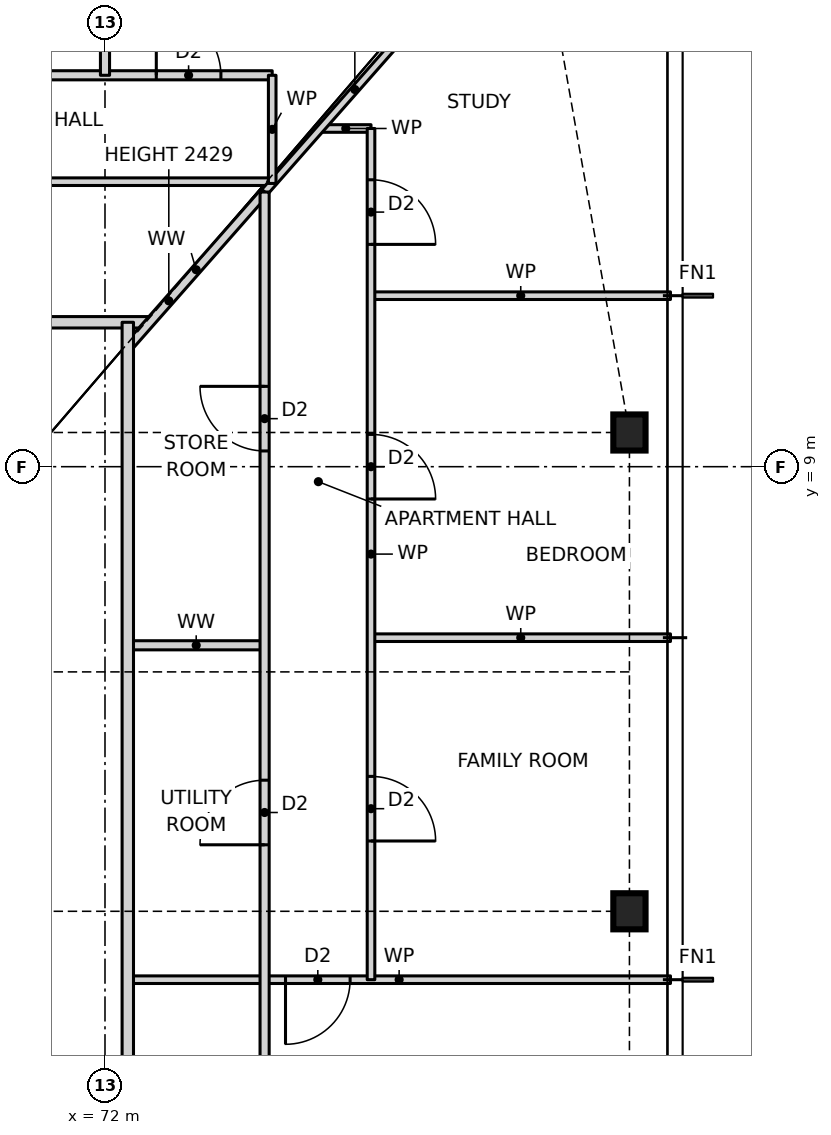
"""IFC4 building model, lengths in metres.
Left out: names, types, materials, properties, quantities, classifications, styles, units other than length and angle.
Written with IfcOpenShell. Run it as: python <this file> out.ifc"""

import sys

from ifc_helpers import new_model, si_unit, direction, frame, frame_2d, origin, origin_2d, place, context, subcontext, project, spatial, rectangle, i_section, extrude, element, fill, save


model = new_model("IFC4")
c1 = context("Model", 3, precision=1e-05, world=origin(), true_north=direction((0.0, 1.0)))
c2 = subcontext(c1, "Body", "Model", "MODEL_VIEW")
j1 = project(units=[si_unit("LENGTHUNIT", "METRE"), si_unit("PLANEANGLEUNIT", "RADIAN")], contexts=[c1])
p1 = place(None, origin())
s1 = spatial("IfcSite", under=j1, at=p1, CompositionType="ELEMENT")
p2 = place(p1, origin())
s2 = spatial("IfcBuilding", under=s1, at=p2, CompositionType="ELEMENT")
p3 = place(p2, frame((0.0, 0.0, 36.0)))
s3 = spatial("IfcBuildingStorey", under=s2, at=p3, CompositionType="ELEMENT", Elevation=36.0)
for number, where, z_axis, x_axis in (
    (1, (78.9, 3.15, 0.0), (0.0, 0.0, 1.0), (1.0, 0.0, 0.0)),
    (2, (78.9, 9.45, 0.0), (0.0, 0.0, 1.0), (1.0, 0.0, 0.0)),
):
    element("IfcColumn", number, at=place(p3, frame(where, z_axis=z_axis, x_axis=x_axis)), inside=s3, PredefinedType="COLUMN", context=c2, shape_type="SweptSolid", body=[
        extrude(i_section(OverallWidth=0.424, OverallDepth=0.475, WebThickness=0.048, FlangeThickness=0.077, at=origin_2d()), origin(), (0.0, 0.0, 1.0), 3.5),
    ])
p4 = place(p3, frame((72.3, 2.25, 0.0), z_axis=(0.0, 0.0, 1.0), x_axis=(1.0, 0.0, 0.0)))
e3 = element("IfcWall", 3, at=p4, inside=s3, PredefinedType="PARTITIONING", context=c2, shape_type="SweptSolid", body=[
    extrude(rectangle(XDim=7.14, YDim=0.1, at=frame_2d((3.57, 0.0))), origin(), (0.0, 0.0, 1.0), 3.27),
])
p5 = place(p4, frame((2.075, 0.0, 0.0)))
e4 = element("IfcOpeningElement", 4, at=p5, cuts=e3, PredefinedType="OPENING", context=c2, shape_type="SweptSolid", body=[
    extrude(rectangle(XDim=0.85, YDim=2.1, at=frame_2d((0.425, 1.05))), frame((0.0, 0.06, 0.0), z_axis=(0.0, -1.0, 0.0), x_axis=(1.0, 0.0, 0.0)), (0.0, 0.0, 1.0), 0.12),
])
p6 = place(p3, frame((72.3, 6.65, 0.0), z_axis=(0.0, 0.0, 1.0), x_axis=(1.0, 0.0, 0.0)))
e5 = element("IfcWall", 5, at=p6, inside=s3, PredefinedType="PARTITIONING", context=c2, shape_type="SweptSolid", body=[
    extrude(rectangle(XDim=1.8, YDim=0.12, at=frame_2d((0.9, 0.0))), origin(), (0.0, 0.0, 1.0), 3.27),
])
p7 = place(p3, frame((75.5, 6.75, 0.0), z_axis=(0.0, 0.0, 1.0), x_axis=(1.0, 0.0, 0.0)))
e6 = element("IfcWall", 6, at=p7, inside=s3, PredefinedType="PARTITIONING", context=c2, shape_type="SweptSolid", body=[
    extrude(rectangle(XDim=3.94, YDim=0.1, at=frame_2d((1.97, 0.0))), origin(), (0.0, 0.0, 1.0), 3.27),
])
p8 = place(p3, frame((53.408, 10.9, 0.0), z_axis=(0.0, 0.0, 1.0), x_axis=(1.0, 0.0, 0.0)))
e7 = element("IfcWall", 7, at=p8, inside=s3, PredefinedType="PARTITIONING", context=c2, shape_type="SweptSolid", body=[
    extrude(rectangle(XDim=19.184, YDim=0.15, at=frame_2d((9.592, 0.0))), origin(), (0.0, 0.0, 1.0), 3.27),
])
p9 = place(p8, frame((8.592, 0.0, 0.0)))
e8 = element("IfcOpeningElement", 8, at=p9, cuts=e7, PredefinedType="OPENING", context=c2, shape_type="SweptSolid", body=[
    extrude(rectangle(XDim=1.0, YDim=2.1, at=frame_2d((0.5, 1.05))), frame((0.0, 0.085, 0.0), z_axis=(0.0, -1.0, 0.0), x_axis=(1.0, 0.0, 0.0)), (0.0, 0.0, 1.0), 0.17),
])
p10 = place(p3, frame((75.5, 11.25, 0.0), z_axis=(0.0, 0.0, 1.0), x_axis=(1.0, 0.0, 0.0)))
e9 = element("IfcWall", 9, at=p10, inside=s3, PredefinedType="PARTITIONING", context=c2, shape_type="SweptSolid", body=[
    extrude(rectangle(XDim=3.94, YDim=0.1, at=frame_2d((1.97, 0.0))), origin(), (0.0, 0.0, 1.0), 3.27),
])
p11 = place(p3, frame((51.8, 12.75, 0.0), z_axis=(0.0, 0.0, 1.0), x_axis=(1.0, 0.0, 0.0)))
e10 = element("IfcWall", 10, at=p11, inside=s3, PredefinedType="PARTITIONING", context=c2, shape_type="SweptSolid", body=[
    extrude(rectangle(XDim=22.4, YDim=0.1, at=frame_2d((11.2, 0.0))), origin(), (0.0, 0.0, 1.0), 3.27),
])
p12 = place(p11, frame((13.475, 0.0, 0.0)))
e11 = element("IfcOpeningElement", 11, at=p12, cuts=e10, PredefinedType="OPENING", context=c2, shape_type="SweptSolid", body=[
    extrude(rectangle(XDim=0.85, YDim=2.1, at=frame_2d((0.425, 1.05))), frame((0.0, 0.06, 0.0), z_axis=(0.0, -1.0, 0.0), x_axis=(1.0, 0.0, 0.0)), (0.0, 0.0, 1.0), 0.12),
])
p13 = place(p11, frame((10.275, 0.0, 0.0)))
e12 = element("IfcOpeningElement", 12, at=p13, cuts=e10, PredefinedType="OPENING", context=c2, shape_type="SweptSolid", body=[
    extrude(rectangle(XDim=0.85, YDim=2.1, at=frame_2d((0.425, 1.05))), frame((0.0, 0.06, 0.0), z_axis=(0.0, -1.0, 0.0), x_axis=(1.0, 0.0, 0.0)), (0.0, 0.0, 1.0), 0.12),
])
p14 = place(p11, frame((18.625, 0.0, 0.0)))
e13 = element("IfcOpeningElement", 13, at=p14, cuts=e10, PredefinedType="OPENING", context=c2, shape_type="SweptSolid", body=[
    extrude(rectangle(XDim=0.85, YDim=2.1, at=frame_2d((0.425, 1.05))), frame((0.0, 0.06, 0.0), z_axis=(0.0, -1.0, 0.0), x_axis=(1.0, 0.0, 0.0)), (0.0, 0.0, 1.0), 0.12),
])
p15 = place(p11, frame((2.925, 0.0, 0.0)))
e14 = element("IfcOpeningElement", 14, at=p15, cuts=e10, PredefinedType="OPENING", context=c2, shape_type="SweptSolid", body=[
    extrude(rectangle(XDim=0.85, YDim=2.1, at=frame_2d((0.425, 1.05))), frame((0.0, 0.06, 0.0), z_axis=(0.0, -1.0, 0.0), x_axis=(1.0, 0.0, 0.0)), (0.0, 0.0, 1.0), 0.12),
])
p16 = place(p3, frame((74.836, 13.45, 0.0), z_axis=(0.0, 0.0, 1.0), x_axis=(1.0, 0.0, 0.0)))
e15 = element("IfcWall", 15, at=p16, inside=s3, PredefinedType="PARTITIONING", context=c2, shape_type="SweptSolid", body=[
    extrude(rectangle(XDim=0.664, YDim=0.1, at=frame_2d((0.332, 0.0))), origin(), (0.0, 0.0, 1.0), 3.27),
])
p17 = place(p3, frame((67.5, 14.15, 0.0), z_axis=(0.0, 0.0, 1.0), x_axis=(1.0, 0.0, 0.0)))
e16 = element("IfcWall", 16, at=p17, inside=s3, PredefinedType="PARTITIONING", context=c2, shape_type="SweptSolid", body=[
    extrude(rectangle(XDim=6.7, YDim=0.12, at=frame_2d((3.35, 0.0))), origin(), (0.0, 0.0, 1.0), 3.27),
])
p18 = place(p17, frame((0.625, 0.0, 0.0)))
e17 = element("IfcOpeningElement", 17, at=p18, cuts=e16, PredefinedType="OPENING", context=c2, shape_type="SweptSolid", body=[
    extrude(rectangle(XDim=0.85, YDim=2.1, at=frame_2d((0.425, 1.05))), frame((0.0, 0.07, 0.0), z_axis=(0.0, -1.0, 0.0), x_axis=(1.0, 0.0, 0.0)), (0.0, 0.0, 1.0), 0.14),
])
p19 = place(p17, frame((5.175, 0.0, 0.0)))
e18 = element("IfcOpeningElement", 18, at=p19, cuts=e16, PredefinedType="OPENING", context=c2, shape_type="SweptSolid", body=[
    extrude(rectangle(XDim=0.85, YDim=2.1, at=frame_2d((0.425, 1.05))), frame((0.0, 0.07, 0.0), z_axis=(0.0, -1.0, 0.0), x_axis=(1.0, 0.0, 0.0)), (0.0, 0.0, 1.0), 0.14),
])
p20 = place(p3, frame((74.1, 12.614, 0.0), z_axis=(0.0, 0.0, 1.0), x_axis=(0.660755619739, 0.750601099775, 0.0)))
e19 = element("IfcWall", 19, at=p20, inside=s3, PredefinedType="PARTITIONING", context=c2, shape_type="SweptSolid", body=[
    extrude(rectangle(XDim=5.989, YDim=0.1, at=frame_2d((2.995, 0.0))), origin(), (0.0, 0.0, 1.0), 2.429),
])
p21 = place(p3, frame((72.299, 10.569, 0.0), z_axis=(0.0, 0.0, 1.0), x_axis=(0.660797520752, 0.750564212155, 0.0)))
e20 = element("IfcWall", 20, at=p21, inside=s3, PredefinedType="PARTITIONING", context=c2, shape_type="SweptSolid", body=[
    extrude(rectangle(XDim=2.725, YDim=0.12, at=frame_2d((1.363, 0.0))), origin(), (0.0, 0.0, 1.0), 2.429),
])
p22 = place(p3, frame((75.5, 2.25, 0.0), z_axis=(0.0, 0.0, 1.0), x_axis=(0.0, 1.0, 0.0)))
e21 = element("IfcWall", 21, at=p22, inside=s3, PredefinedType="PARTITIONING", context=c2, shape_type="SweptSolid", body=[
    extrude(rectangle(XDim=11.2, YDim=0.1, at=frame_2d((5.6, 0.0))), origin(), (0.0, 0.0, 1.0), 3.27),
])
p23 = place(p22, frame((1.825, 0.0, 0.0)))
e22 = element("IfcOpeningElement", 22, at=p23, cuts=e21, PredefinedType="OPENING", context=c2, shape_type="SweptSolid", body=[
    extrude(rectangle(XDim=0.85, YDim=2.1, at=frame_2d((0.425, 1.05))), frame((0.0, 0.06, 0.0), z_axis=(0.0, -1.0, 0.0), x_axis=(1.0, 0.0, 0.0)), (0.0, 0.0, 1.0), 0.12),
])
p24 = place(p22, frame((6.325, 0.0, 0.0)))
e23 = element("IfcOpeningElement", 23, at=p24, cuts=e21, PredefinedType="OPENING", context=c2, shape_type="SweptSolid", body=[
    extrude(rectangle(XDim=0.85, YDim=2.1, at=frame_2d((0.425, 1.05))), frame((0.0, 0.06, 0.0), z_axis=(0.0, -1.0, 0.0), x_axis=(1.0, 0.0, 0.0)), (0.0, 0.0, 1.0), 0.12),
])
p25 = place(p22, frame((9.675, 0.0, 0.0)))
e24 = element("IfcOpeningElement", 24, at=p25, cuts=e21, PredefinedType="OPENING", context=c2, shape_type="SweptSolid", body=[
    extrude(rectangle(XDim=0.85, YDim=2.1, at=frame_2d((0.425, 1.05))), frame((0.0, 0.06, 0.0), z_axis=(0.0, -1.0, 0.0), x_axis=(1.0, 0.0, 0.0)), (0.0, 0.0, 1.0), 0.12),
])
p26 = place(p3, frame((74.2, 12.727, 0.0), z_axis=(0.0, 0.0, 1.0), x_axis=(0.0, 1.0, 0.0)))
e25 = element("IfcWall", 25, at=p26, inside=s3, PredefinedType="PARTITIONING", context=c2, shape_type="SweptSolid", body=[
    extrude(rectangle(XDim=1.423, YDim=0.1, at=frame_2d((0.711, 0.0))), origin(), (0.0, 0.0, 1.0), 3.27),
])
p27 = place(p3, frame((74.1, -12.614, 0.0), z_axis=(0.0, 0.0, 1.0), x_axis=(0.0, 1.0, 0.0)))
e26 = element("IfcWall", 26, at=p27, inside=s3, PredefinedType="PARTITIONING", context=c2, shape_type="SweptSolid", body=[
    extrude(rectangle(XDim=25.228, YDim=0.12, at=frame_2d((12.614, 0.0))), origin(), (0.0, 0.0, 1.0), 3.27),
])
p28 = place(p27, frame((7.239, 0.0, 0.0)))
e27 = element("IfcOpeningElement", 27, at=p28, cuts=e26, PredefinedType="OPENING", context=c2, shape_type="SweptSolid", body=[
    extrude(rectangle(XDim=0.85, YDim=2.1, at=frame_2d((0.425, 1.05))), frame((0.0, 0.07, 0.0), z_axis=(0.0, -1.0, 0.0), x_axis=(1.0, 0.0, 0.0)), (0.0, 0.0, 1.0), 0.14),
])
p29 = place(p27, frame((10.439, 0.0, 0.0)))
e28 = element("IfcOpeningElement", 28, at=p29, cuts=e26, PredefinedType="OPENING", context=c2, shape_type="SweptSolid", body=[
    extrude(rectangle(XDim=0.85, YDim=2.1, at=frame_2d((0.425, 1.05))), frame((0.0, 0.07, 0.0), z_axis=(0.0, -1.0, 0.0), x_axis=(1.0, 0.0, 0.0)), (0.0, 0.0, 1.0), 0.14),
])
p30 = place(p27, frame((2.507, 0.0, 0.0)))
e29 = element("IfcOpeningElement", 29, at=p30, cuts=e26, PredefinedType="OPENING", context=c2, shape_type="SweptSolid", body=[
    extrude(rectangle(XDim=0.85, YDim=2.1, at=frame_2d((0.425, 1.05))), frame((0.0, 0.07, 0.0), z_axis=(0.0, -1.0, 0.0), x_axis=(1.0, 0.0, 0.0)), (0.0, 0.0, 1.0), 0.14),
])
p31 = place(p27, frame((16.639, 0.0, 0.0)))
e30 = element("IfcOpeningElement", 30, at=p31, cuts=e26, PredefinedType="OPENING", context=c2, shape_type="SweptSolid", body=[
    extrude(rectangle(XDim=0.85, YDim=2.1, at=frame_2d((0.425, 1.05))), frame((0.0, 0.07, 0.0), z_axis=(0.0, -1.0, 0.0), x_axis=(1.0, 0.0, 0.0)), (0.0, 0.0, 1.0), 0.14),
])
p32 = place(p27, frame((21.821, 0.0, 0.0)))
e31 = element("IfcOpeningElement", 31, at=p32, cuts=e26, PredefinedType="OPENING", context=c2, shape_type="SweptSolid", body=[
    extrude(rectangle(XDim=0.85, YDim=2.1, at=frame_2d((0.425, 1.05))), frame((0.0, 0.07, 0.0), z_axis=(0.0, -1.0, 0.0), x_axis=(1.0, 0.0, 0.0)), (0.0, 0.0, 1.0), 0.14),
])
p33 = place(p3, frame((72.3, -10.568, 0.0), z_axis=(0.0, 0.0, 1.0), x_axis=(0.0, 1.0, 0.0)))
e32 = element("IfcWall", 32, at=p33, inside=s3, PredefinedType="PARTITIONING", context=c2, shape_type="SweptSolid", body=[
    extrude(rectangle(XDim=21.468, YDim=0.15, at=frame_2d((10.734, 0.0))), origin(), (0.0, 0.0, 1.0), 3.27),
])
p34 = place(p33, frame((8.318, 0.0, 0.0)))
e33 = element("IfcOpeningElement", 33, at=p34, cuts=e32, PredefinedType="OPENING", context=c2, shape_type="SweptSolid", body=[
    extrude(rectangle(XDim=1.0, YDim=2.1, at=frame_2d((0.5, 1.05))), frame((0.0, 0.085, 0.0), z_axis=(0.0, -1.0, 0.0), x_axis=(1.0, 0.0, 0.0)), (0.0, 0.0, 1.0), 0.17),
])
p35 = place(p3, frame((72.0, 14.15, 0.0), z_axis=(0.0, 0.0, 1.0), x_axis=(0.0, 1.0, 0.0)))
e34 = element("IfcWall", 34, at=p35, inside=s3, PredefinedType="PARTITIONING", context=c2, shape_type="SweptSolid", body=[
    extrude(rectangle(XDim=4.54, YDim=0.12, at=frame_2d((2.27, 0.0))), origin(), (0.0, 0.0, 1.0), 3.27),
])
p36 = place(p5, frame((0.85, 0.0, 0.0), z_axis=(0.0, 0.0, 1.0), x_axis=(-1.0, 0.0, 0.0)))
e35 = element("IfcDoor", 35, at=p36, inside=s3, OperationType="SINGLE_SWING_RIGHT", PredefinedType="DOOR", context=c2, shape_type="SweptSolid", body=[
    extrude(rectangle(XDim=0.85, YDim=2.1, at=frame_2d((0.425, 1.05))), frame((0.0, 0.025, 0.0), z_axis=(0.0, -1.0, 0.0), x_axis=(1.0, 0.0, 0.0)), (0.0, 0.0, 1.0), 0.05),
])
fill(e4, e35)
p37 = place(p23, frame((0.85, 0.0, 0.0), z_axis=(0.0, 0.0, 1.0), x_axis=(-1.0, 0.0, 0.0)))
e36 = element("IfcDoor", 36, at=p37, inside=s3, OperationType="SINGLE_SWING_RIGHT", PredefinedType="DOOR", context=c2, shape_type="SweptSolid", body=[
    extrude(rectangle(XDim=0.85, YDim=2.1, at=frame_2d((0.425, 1.05))), frame((0.0, 0.025, 0.0), z_axis=(0.0, -1.0, 0.0), x_axis=(1.0, 0.0, 0.0)), (0.0, 0.0, 1.0), 0.05),
])
fill(e22, e36)
p38 = place(p24, frame((0.85, 0.0, 0.0), z_axis=(0.0, 0.0, 1.0), x_axis=(-1.0, 0.0, 0.0)))
e37 = element("IfcDoor", 37, at=p38, inside=s3, OperationType="SINGLE_SWING_RIGHT", PredefinedType="DOOR", context=c2, shape_type="SweptSolid", body=[
    extrude(rectangle(XDim=0.85, YDim=2.1, at=frame_2d((0.425, 1.05))), frame((0.0, 0.025, 0.0), z_axis=(0.0, -1.0, 0.0), x_axis=(1.0, 0.0, 0.0)), (0.0, 0.0, 1.0), 0.05),
])
fill(e23, e37)
p39 = place(p25, frame((0.85, 0.0, 0.0), z_axis=(0.0, 0.0, 1.0), x_axis=(-1.0, 0.0, 0.0)))
e38 = element("IfcDoor", 38, at=p39, inside=s3, OperationType="SINGLE_SWING_RIGHT", PredefinedType="DOOR", context=c2, shape_type="SweptSolid", body=[
    extrude(rectangle(XDim=0.85, YDim=2.1, at=frame_2d((0.425, 1.05))), frame((0.0, 0.025, 0.0), z_axis=(0.0, -1.0, 0.0), x_axis=(1.0, 0.0, 0.0)), (0.0, 0.0, 1.0), 0.05),
])
fill(e24, e38)
p40 = place(p31, origin())
e39 = element("IfcDoor", 39, at=p40, inside=s3, OperationType="SINGLE_SWING_LEFT", PredefinedType="DOOR", context=c2, shape_type="SweptSolid", body=[
    extrude(rectangle(XDim=0.85, YDim=2.1, at=frame_2d((0.425, 1.05))), frame((0.0, 0.025, 0.0), z_axis=(0.0, -1.0, 0.0), x_axis=(1.0, 0.0, 0.0)), (0.0, 0.0, 1.0), 0.05),
])
fill(e30, e39)
p41 = place(p32, origin())
e40 = element("IfcDoor", 40, at=p41, inside=s3, OperationType="SINGLE_SWING_RIGHT", PredefinedType="DOOR", context=c2, shape_type="SweptSolid", body=[
    extrude(rectangle(XDim=0.85, YDim=2.1, at=frame_2d((0.425, 1.05))), frame((0.0, 0.025, 0.0), z_axis=(0.0, -1.0, 0.0), x_axis=(1.0, 0.0, 0.0)), (0.0, 0.0, 1.0), 0.05),
])
fill(e31, e40)
p42 = place(p19, origin())
e41 = element("IfcDoor", 41, at=p42, inside=s3, OperationType="SINGLE_SWING_LEFT", PredefinedType="DOOR", context=c2, shape_type="SweptSolid", body=[
    extrude(rectangle(XDim=0.85, YDim=2.1, at=frame_2d((0.425, 1.05))), frame((0.0, 0.025, 0.0), z_axis=(0.0, -1.0, 0.0), x_axis=(1.0, 0.0, 0.0)), (0.0, 0.0, 1.0), 0.05),
])
fill(e18, e41)
save(model, sys.argv[1])
